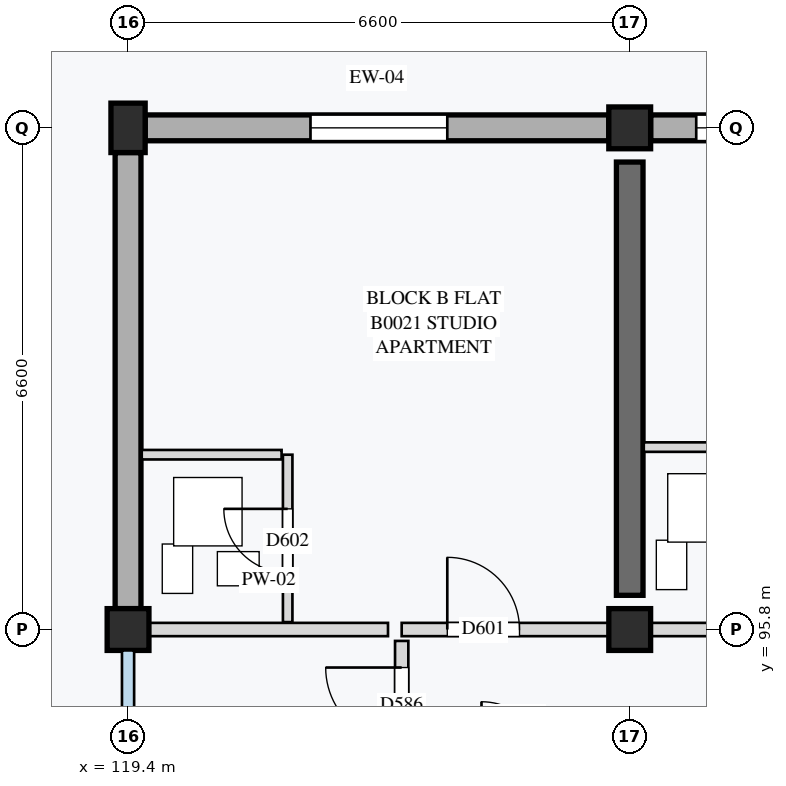
"""IFC4 building model, lengths in metres.
Left out: names, types, materials, properties, quantities, classifications, styles, units other than length and angle.
Written with IfcOpenShell. Run it as: python <this file> out.ifc"""

import sys

from ifc_helpers import new_model, si_unit, direction, frame, frame_2d, origin, origin_2d, place, context, subcontext, project, spatial, rectangle, extrude, element, fill, save


model = new_model("IFC4")
c1 = context("Model", 3, precision=1e-05, world=origin(), true_north=direction((0.0, 1.0)))
c2 = subcontext(c1, "Body", "Model", "MODEL_VIEW")
j1 = project(units=[si_unit("LENGTHUNIT", "METRE"), si_unit("PLANEANGLEUNIT", "RADIAN")], contexts=[c1])
p1 = place(None, origin())
s1 = spatial("IfcSite", under=j1, at=p1, CompositionType="ELEMENT")
p2 = place(p1, origin())
s2 = spatial("IfcBuilding", under=s1, at=p2, CompositionType="ELEMENT")
p3 = place(p2, origin())
s3 = spatial("IfcBuildingStorey", under=s2, at=p3, CompositionType="ELEMENT", Elevation=0.0)
p4 = place(p3, frame((119.4, 95.8, 0.0), z_axis=(0.0, 0.0, 1.0), x_axis=(1.0, 0.0, 0.0)))
e1 = element("IfcColumn", 1, at=p4, inside=s3, PredefinedType="COLUMN", context=c2, shape_type="SweptSolid", body=[
    extrude(rectangle(XDim=0.55, YDim=0.55, at=origin_2d()), origin(), (0.0, 0.0, 1.0), 4.2),
])
p5 = place(p3, frame((119.4, 102.4, 0.0), z_axis=(0.0, 0.0, 1.0), x_axis=(1.0, 0.0, 0.0)))
e2 = element("IfcColumn", 2, at=p5, inside=s3, PredefinedType="COLUMN", context=c2, shape_type="SweptSolid", body=[
    extrude(rectangle(XDim=0.45, YDim=0.65, at=origin_2d()), origin(), (0.0, 0.0, 1.0), 4.2),
])
for number, where, z_axis, x_axis in (
    (3, (126.0, 95.8, 0.0), (0.0, 0.0, 1.0), (1.0, 0.0, 0.0)),
    (4, (126.0, 102.4, 0.0), (0.0, 0.0, 1.0), (1.0, 0.0, 0.0)),
):
    element("IfcColumn", number, at=place(p3, frame(where, z_axis=z_axis, x_axis=x_axis)), inside=s3, PredefinedType="COLUMN", context=c2, shape_type="SweptSolid", body=[
        extrude(rectangle(XDim=0.55, YDim=0.55, at=origin_2d()), origin(), (0.0, 0.0, 1.0), 4.2),
    ])
p6 = place(p3, frame((126.0, 96.25, 0.0), z_axis=(0.0, 0.0, 1.0), x_axis=(0.0, 1.0, 0.0)))
e5 = element("IfcWall", 5, at=p6, inside=s3, PredefinedType="SHEAR", context=c2, shape_type="SweptSolid", body=[
    extrude(rectangle(XDim=5.7, YDim=0.35, at=frame_2d((2.85, 0.0))), origin(), (0.0, 0.0, 1.0), 3.92),
])
p7 = place(p3, frame((119.625, 102.4, 0.0), z_axis=(0.0, 0.0, 1.0), x_axis=(1.0, 0.0, 0.0)))
e6 = element("IfcWall", 6, at=p7, inside=s3, PredefinedType="STANDARD", context=c2, shape_type="SweptSolid", body=[
    extrude(rectangle(XDim=6.1, YDim=0.34, at=frame_2d((3.05, 0.0))), origin(), (0.0, 0.0, 1.0), 3.6),
])
p8 = place(p7, frame((2.175, 0.0, 0.85)))
e7 = element("IfcOpeningElement", 7, at=p8, cuts=e6, PredefinedType="OPENING", context=c2, shape_type="SweptSolid", body=[
    extrude(rectangle(XDim=1.8, YDim=1.35, at=frame_2d((0.9, 0.675))), frame((0.0, 0.18, 0.0), z_axis=(0.0, -1.0, 0.0), x_axis=(1.0, 0.0, 0.0)), (0.0, 0.0, 1.0), 0.36),
])
p9 = place(p3, frame((126.275, 102.4, 0.0), z_axis=(0.0, 0.0, 1.0), x_axis=(1.0, 0.0, 0.0)))
e8 = element("IfcWall", 8, at=p9, inside=s3, PredefinedType="STANDARD", context=c2, shape_type="SweptSolid", body=[
    extrude(rectangle(XDim=6.05, YDim=0.34, at=frame_2d((3.025, 0.0))), origin(), (0.0, 0.0, 1.0), 3.6),
])
p10 = place(p9, frame((0.6, 0.0, 0.85)))
e9 = element("IfcOpeningElement", 9, at=p10, cuts=e8, PredefinedType="OPENING", context=c2, shape_type="SweptSolid", body=[
    extrude(rectangle(XDim=1.8, YDim=1.35, at=frame_2d((0.9, 0.675))), frame((0.0, 0.18, 0.0), z_axis=(0.0, -1.0, 0.0), x_axis=(1.0, 0.0, 0.0)), (0.0, 0.0, 1.0), 0.36),
])
p11 = place(p9, frame((4.025, 0.0, 0.85)))
e10 = element("IfcOpeningElement", 10, at=p11, cuts=e8, PredefinedType="OPENING", context=c2, shape_type="SweptSolid", body=[
    extrude(rectangle(XDim=1.5, YDim=1.35, at=frame_2d((0.75, 0.675))), frame((0.0, 0.18, 0.0), z_axis=(0.0, -1.0, 0.0), x_axis=(1.0, 0.0, 0.0)), (0.0, 0.0, 1.0), 0.36),
])
p12 = place(p3, frame((119.4, 96.075, 0.0), z_axis=(0.0, 0.0, 1.0), x_axis=(0.0, 1.0, 0.0)))
e11 = element("IfcWall", 11, at=p12, inside=s3, PredefinedType="STANDARD", context=c2, shape_type="SweptSolid", body=[
    extrude(rectangle(XDim=6.0, YDim=0.34, at=frame_2d((3.0, 0.0))), origin(), (0.0, 0.0, 1.0), 3.65),
])
p13 = place(p3, frame((123.0, 92.65, 0.0), z_axis=(0.0, 0.0, 1.0), x_axis=(0.0, 1.0, 0.0)))
e12 = element("IfcWall", 12, at=p13, inside=s3, PredefinedType="PARTITIONING", context=c2, shape_type="SweptSolid", body=[
    extrude(rectangle(XDim=3.0, YDim=0.175, at=frame_2d((1.5, 0.0))), origin(), (0.0, 0.0, 1.0), 3.92),
])
p14 = place(p13, frame((1.65, 0.0, 0.0)))
e13 = element("IfcOpeningElement", 13, at=p14, cuts=e12, PredefinedType="OPENING", context=c2, shape_type="SweptSolid", body=[
    extrude(rectangle(XDim=1.0, YDim=2.1, at=frame_2d((0.5, 1.05))), frame((0.0, 0.097, 0.0), z_axis=(0.0, -1.0, 0.0), x_axis=(1.0, 0.0, 0.0)), (0.0, 0.0, 1.0), 0.195),
])
p15 = place(p3, frame((119.68, 95.8, 0.0), z_axis=(0.0, 0.0, 1.0), x_axis=(1.0, 0.0, 0.0)))
e14 = element("IfcWall", 14, at=p15, inside=s3, PredefinedType="PARTITIONING", context=c2, shape_type="SweptSolid", body=[
    extrude(rectangle(XDim=3.14, YDim=0.175, at=frame_2d((1.57, 0.0))), origin(), (0.0, 0.0, 1.0), 3.55),
])
p16 = place(p3, frame((123.0, 95.8, 0.0), z_axis=(0.0, 0.0, 1.0), x_axis=(1.0, 0.0, 0.0)))
e15 = element("IfcWall", 15, at=p16, inside=s3, PredefinedType="PARTITIONING", context=c2, shape_type="SweptSolid", body=[
    extrude(rectangle(XDim=3.0, YDim=0.175, at=frame_2d((1.5, 0.0))), origin(), (0.0, 0.0, 1.0), 3.55),
])
p17 = place(p16, frame((0.6, 0.0, 0.0)))
e16 = element("IfcOpeningElement", 16, at=p17, cuts=e15, PredefinedType="OPENING", context=c2, shape_type="SweptSolid", body=[
    extrude(rectangle(XDim=0.95, YDim=2.16, at=frame_2d((0.475, 1.08))), frame((0.0, 0.097, 0.0), z_axis=(0.0, -1.0, 0.0), x_axis=(1.0, 0.0, 0.0)), (0.0, 0.0, 1.0), 0.195),
])
p18 = place(p3, frame((121.5, 95.897, 0.0), z_axis=(0.0, 0.0, 1.0), x_axis=(0.0, 1.0, 0.0)))
e17 = element("IfcWall", 17, at=p18, inside=s3, PredefinedType="PARTITIONING", context=c2, shape_type="SweptSolid", body=[
    extrude(rectangle(XDim=2.203, YDim=0.125, at=frame_2d((1.101, 0.0))), origin(), (0.0, 0.0, 1.0), 3.92),
])
p19 = place(p18, frame((0.65, 0.0, 0.0)))
e18 = element("IfcOpeningElement", 18, at=p19, cuts=e17, PredefinedType="OPENING", context=c2, shape_type="SweptSolid", body=[
    extrude(rectangle(XDim=0.84, YDim=2.06, at=frame_2d((0.42, 1.03))), frame((0.0, 0.073, 0.0), z_axis=(0.0, -1.0, 0.0), x_axis=(1.0, 0.0, 0.0)), (0.0, 0.0, 1.0), 0.145),
])
p20 = place(p3, frame((119.58, 98.1, 0.0), z_axis=(0.0, 0.0, 1.0), x_axis=(1.0, 0.0, 0.0)))
e19 = element("IfcWall", 19, at=p20, inside=s3, PredefinedType="PARTITIONING", context=c2, shape_type="SweptSolid", body=[
    extrude(rectangle(XDim=1.84, YDim=0.125, at=frame_2d((0.92, 0.0))), origin(), (0.0, 0.0, 1.0), 3.92),
])
p21 = place(p3, frame((126.0, 95.8, 0.0), z_axis=(0.0, 0.0, 1.0), x_axis=(1.0, 0.0, 0.0)))
e20 = element("IfcWall", 20, at=p21, inside=s3, PredefinedType="PARTITIONING", context=c2, shape_type="SweptSolid", body=[
    extrude(rectangle(XDim=6.6, YDim=0.175, at=frame_2d((3.3, 0.0))), origin(), (0.0, 0.0, 1.0), 3.55),
])
p22 = place(p21, frame((3.85, 0.0, 0.0)))
e21 = element("IfcOpeningElement", 21, at=p22, cuts=e20, PredefinedType="OPENING", context=c2, shape_type="SweptSolid", body=[
    extrude(rectangle(XDim=0.96, YDim=2.18, at=frame_2d((0.48, 1.09))), frame((0.0, 0.097, 0.0), z_axis=(0.0, -1.0, 0.0), x_axis=(1.0, 0.0, 0.0)), (0.0, 0.0, 1.0), 0.195),
])
p23 = place(p3, frame((126.185, 98.2, 0.0), z_axis=(0.0, 0.0, 1.0), x_axis=(1.0, 0.0, 0.0)))
e22 = element("IfcWall", 22, at=p23, inside=s3, PredefinedType="PARTITIONING", context=c2, shape_type="SweptSolid", body=[
    extrude(rectangle(XDim=1.635, YDim=0.125, at=frame_2d((0.817, 0.0))), origin(), (0.0, 0.0, 1.0), 3.92),
])
p24 = place(p8, origin())
e23 = element("IfcWindow", 23, at=p24, inside=s3, PartitioningType="SINGLE_PANEL", PredefinedType="WINDOW", context=c2, shape_type="SweptSolid", body=[
    extrude(rectangle(XDim=1.8, YDim=1.35, at=frame_2d((0.9, 0.675))), frame((0.0, 0.03, 0.0), z_axis=(0.0, -1.0, 0.0), x_axis=(1.0, 0.0, 0.0)), (0.0, 0.0, 1.0), 0.06),
])
fill(e7, e23)
p25 = place(p10, origin())
e24 = element("IfcWindow", 24, at=p25, inside=s3, PartitioningType="SINGLE_PANEL", PredefinedType="WINDOW", context=c2, shape_type="SweptSolid", body=[
    extrude(rectangle(XDim=1.8, YDim=1.35, at=frame_2d((0.9, 0.675))), frame((0.0, 0.03, 0.0), z_axis=(0.0, -1.0, 0.0), x_axis=(1.0, 0.0, 0.0)), (0.0, 0.0, 1.0), 0.06),
])
fill(e9, e24)
p26 = place(p14, origin())
e25 = element("IfcDoor", 25, at=p26, inside=s3, OperationType="SINGLE_SWING_RIGHT", PredefinedType="DOOR", context=c2, shape_type="SweptSolid", body=[
    extrude(rectangle(XDim=1.0, YDim=2.1, at=frame_2d((0.5, 1.05))), frame((0.0, 0.025, 0.0), z_axis=(0.0, -1.0, 0.0), x_axis=(1.0, 0.0, 0.0)), (0.0, 0.0, 1.0), 0.05),
])
fill(e13, e25)
p27 = place(p17, origin())
e26 = element("IfcDoor", 26, at=p27, inside=s3, OperationType="SINGLE_SWING_LEFT", PredefinedType="DOOR", context=c2, shape_type="SweptSolid", body=[
    extrude(rectangle(XDim=0.95, YDim=2.16, at=frame_2d((0.475, 1.08))), frame((0.0, 0.025, 0.0), z_axis=(0.0, -1.0, 0.0), x_axis=(1.0, 0.0, 0.0)), (0.0, 0.0, 1.0), 0.05),
])
fill(e16, e26)
p28 = place(p19, origin())
e27 = element("IfcDoor", 27, at=p28, inside=s3, OperationType="SINGLE_SWING_RIGHT", PredefinedType="DOOR", context=c2, shape_type="SweptSolid", body=[
    extrude(rectangle(XDim=0.84, YDim=2.06, at=frame_2d((0.42, 1.03))), frame((0.0, 0.025, 0.0), z_axis=(0.0, -1.0, 0.0), x_axis=(1.0, 0.0, 0.0)), (0.0, 0.0, 1.0), 0.05),
])
fill(e18, e27)
save(model, sys.argv[1])
